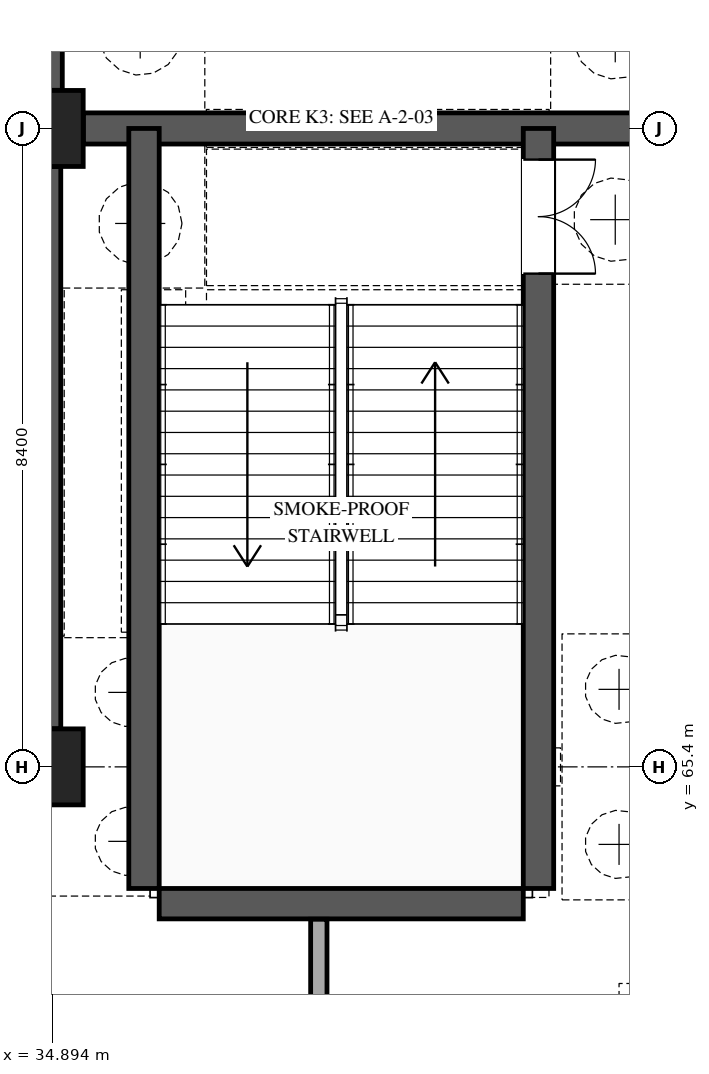
"""IFC4 building model, lengths in metres.
Left out: names, types, materials, properties, quantities, classifications, styles, units other than length and angle.
Written with IfcOpenShell. Run it as: python <this file> out.ifc"""

import sys

from ifc_helpers import new_model, si_unit, direction, frame, frame_2d, origin, origin_2d, place, context, subcontext, project, spatial, rectangle, extrude, element, fill, save


model = new_model("IFC4")
c1 = context("Model", 3, precision=1e-05, world=origin(), true_north=direction((0.0, 1.0)))
c2 = subcontext(c1, "Body", "Model", "MODEL_VIEW")
j1 = project(units=[si_unit("LENGTHUNIT", "METRE"), si_unit("PLANEANGLEUNIT", "RADIAN")], contexts=[c1])
p1 = place(None, origin())
s1 = spatial("IfcSite", under=j1, at=p1, CompositionType="ELEMENT")
p2 = place(p1, origin())
s2 = spatial("IfcBuilding", under=s1, at=p2, CompositionType="ELEMENT")
p3 = place(p2, frame((0.0, 0.0, -9.6)))
s3 = spatial("IfcBuildingStorey", under=s2, at=p3, CompositionType="ELEMENT", Elevation=-9.6)
for number, where, z_axis, x_axis in (
    (1, (34.8, 65.4, 0.0), (0.0, 0.0, 1.0), (1.0, 0.0, 0.0)),
    (2, (34.8, 73.8, 0.0), (0.0, 0.0, 1.0), (1.0, 0.0, 0.0)),
):
    element("IfcColumn", number, at=place(p3, frame(where, z_axis=z_axis, x_axis=x_axis)), inside=s3, PredefinedType="COLUMN", context=c2, shape_type="SweptSolid", body=[
        extrude(rectangle(XDim=1.0, YDim=1.0, at=origin_2d()), origin(), (0.0, 0.0, 1.0), 4.8),
    ])
p4 = place(p3, frame((34.8, 74.302, 0.0), z_axis=(0.0, 0.0, 1.0), x_axis=(0.0, 1.0, 0.0)))
e3 = element("IfcWall", 3, at=p4, inside=s3, PredefinedType="USERDEFINED", context=c2, shape_type="SweptSolid", body=[
    extrude(rectangle(XDim=7.446, YDim=0.45, at=frame_2d((3.723, 0.0))), origin(), (0.0, 0.0, 1.0), 4.8),
])
p5 = place(p3, frame((34.8, 65.902, 0.0), z_axis=(0.0, 0.0, 1.0), x_axis=(0.0, 1.0, 0.0)))
e4 = element("IfcWall", 4, at=p5, inside=s3, PredefinedType="USERDEFINED", context=c2, shape_type="SweptSolid", body=[
    extrude(rectangle(XDim=7.396, YDim=0.41, at=frame_2d((3.698, 0.0))), origin(), (0.0, 0.0, 1.0), 4.48),
])
p6 = place(p3, frame((35.302, 73.8, 0.0), z_axis=(0.0, 0.0, 1.0), x_axis=(1.0, 0.0, 0.0)))
e5 = element("IfcWall", 5, at=p6, inside=s3, PredefinedType="USERDEFINED", context=c2, shape_type="SweptSolid", body=[
    extrude(rectangle(XDim=7.696, YDim=0.41, at=frame_2d((3.848, 0.0))), origin(), (0.0, 0.0, 1.0), 4.48),
])
p7 = place(p3, frame((36.1, 63.8, 0.0), z_axis=(0.0, 0.0, 1.0), x_axis=(0.0, 1.0, 0.0)))
e6 = element("IfcWall", 6, at=p7, inside=s3, PredefinedType="SHEAR", context=c2, shape_type="SweptSolid", body=[
    extrude(rectangle(XDim=10.0, YDim=0.4, at=frame_2d((5.0, 0.0))), origin(), (0.0, 0.0, 1.0), 4.8),
])
p8 = place(p3, frame((41.29, 73.8, 0.0), z_axis=(0.0, 0.0, 1.0), x_axis=(0.0, -1.0, 0.0)))
e7 = element("IfcWall", 7, at=p8, inside=s3, PredefinedType="SHEAR", context=c2, shape_type="SweptSolid", body=[
    extrude(rectangle(XDim=10.0, YDim=0.4, at=frame_2d((5.0, 0.0))), origin(), (0.0, 0.0, 1.0), 4.8),
])
p9 = place(p8, frame((0.41, 0.0, 0.0)))
e8 = element("IfcOpeningElement", 8, at=p9, cuts=e7, PredefinedType="OPENING", context=c2, shape_type="SweptSolid", body=[
    extrude(rectangle(XDim=1.5, YDim=2.2, at=frame_2d((0.75, 1.1))), frame((0.0, 0.21, 0.0), z_axis=(0.0, -1.0, 0.0), x_axis=(1.0, 0.0, 0.0)), (0.0, 0.0, 1.0), 0.42),
])
p10 = place(p3, frame((41.09, 63.6, 0.0), z_axis=(0.0, 0.0, 1.0), x_axis=(-1.0, 0.0, 0.0)))
e9 = element("IfcWall", 9, at=p10, inside=s3, PredefinedType="SHEAR", context=c2, shape_type="SweptSolid", body=[
    extrude(rectangle(XDim=4.79, YDim=0.4, at=frame_2d((2.395, 0.0))), origin(), (0.0, 0.0, 1.0), 4.8),
])
p11 = place(p3, frame((38.4, 50.4, 0.0), z_axis=(0.0, 0.0, 1.0), x_axis=(0.0, 1.0, 0.0)))
e10 = element("IfcWall", 10, at=p11, inside=s3, PredefinedType="PARTITIONING", context=c2, shape_type="SweptSolid", body=[
    extrude(rectangle(XDim=12.995, YDim=0.215, at=frame_2d((6.498, 0.0))), origin(), (0.0, 0.0, 1.0), 3.67),
])
p12 = place(p9, origin())
e11 = element("IfcDoor", 11, at=p12, inside=s3, OperationType="DOUBLE_DOOR_SINGLE_SWING", PredefinedType="DOOR", context=c2, shape_type="SweptSolid", body=[
    extrude(rectangle(XDim=1.5, YDim=2.2, at=frame_2d((0.75, 1.1))), frame((0.0, 0.025, 0.0), z_axis=(0.0, -1.0, 0.0), x_axis=(1.0, 0.0, 0.0)), (0.0, 0.0, 1.0), 0.05),
])
fill(e8, e11)
save(model, sys.argv[1])
